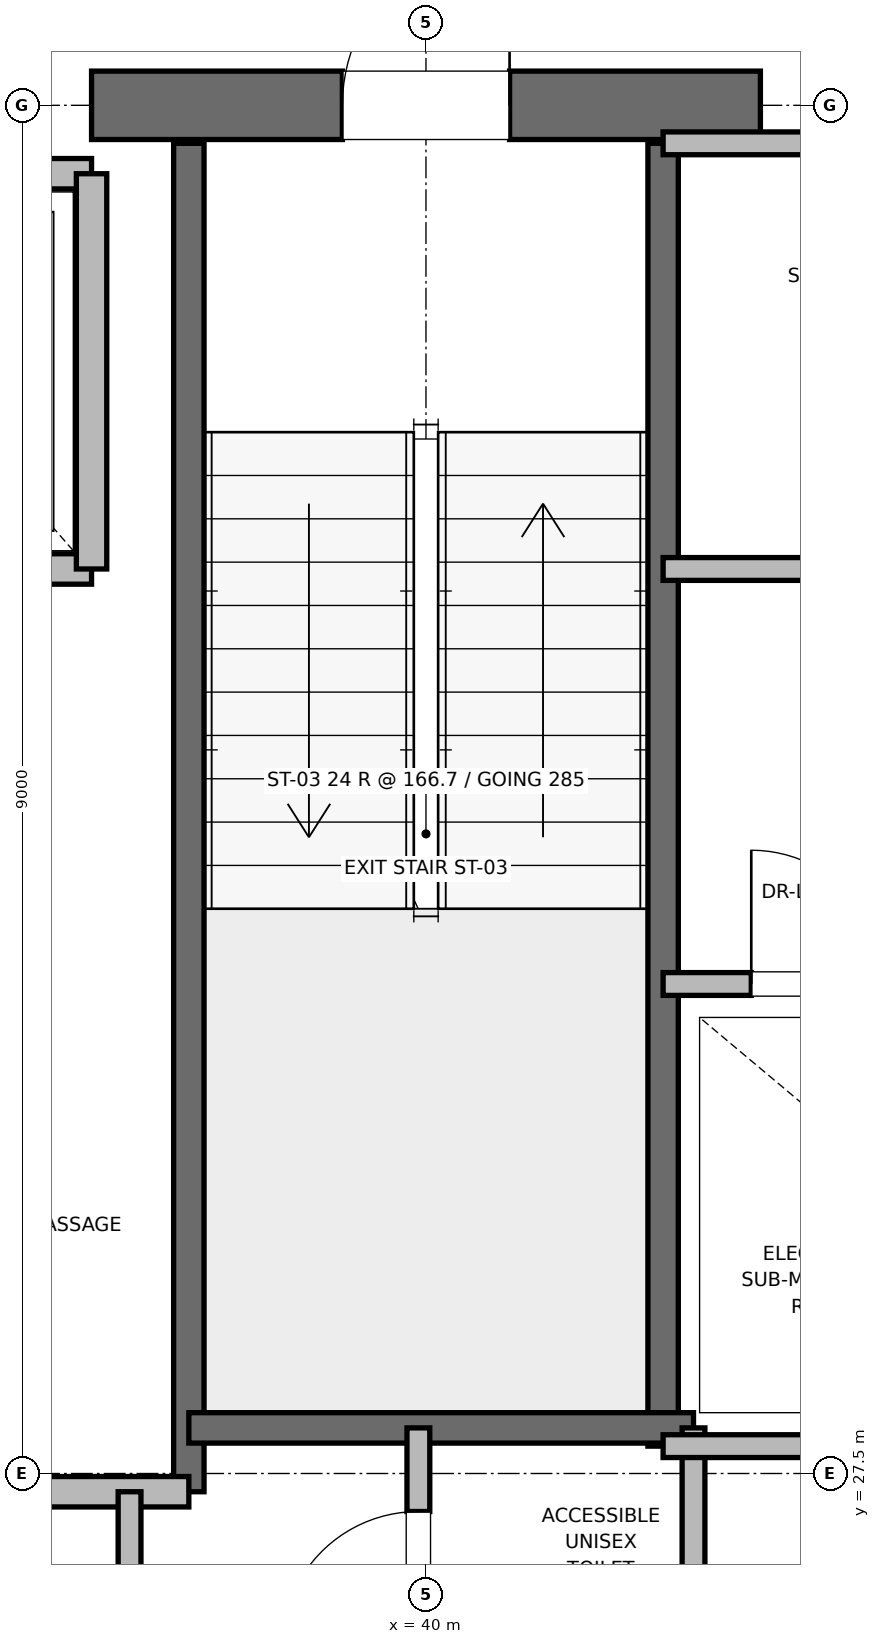
"""IFC4 building model, lengths in metres.
Left out: names, types, materials, properties, quantities, classifications, styles, units other than length and angle.
Written with IfcOpenShell. Run it as: python <this file> out.ifc"""

import sys

from ifc_helpers import new_model, si_unit, direction, frame, frame_2d, origin, place, context, subcontext, project, spatial, rectangle, extrude, element, fill, save


model = new_model("IFC4")
c1 = context("Model", 3, precision=1e-05, world=origin(), true_north=direction((0.0, 1.0)))
c2 = subcontext(c1, "Body", "Model", "MODEL_VIEW")
j1 = project(units=[si_unit("LENGTHUNIT", "METRE"), si_unit("PLANEANGLEUNIT", "RADIAN")], contexts=[c1])
p1 = place(None, origin())
s1 = spatial("IfcSite", under=j1, at=p1, CompositionType="ELEMENT")
p2 = place(p1, origin())
s2 = spatial("IfcBuilding", under=s1, at=p2, CompositionType="ELEMENT")
p3 = place(p2, frame((0.0, 0.0, 283.2)))
s3 = spatial("IfcBuildingStorey", under=s2, at=p3, CompositionType="ELEMENT", Elevation=283.2)
p4 = place(p3, frame((37.8, 36.5, 0.0), z_axis=(0.0, 0.0, 1.0), x_axis=(1.0, 0.0, 0.0)))
e1 = element("IfcWall", 1, at=p4, inside=s3, PredefinedType="SHEAR", context=c2, shape_type="SweptSolid", body=[
    extrude(rectangle(XDim=4.4, YDim=0.45, at=frame_2d((2.2, 0.0))), origin(), (0.0, 0.0, 1.0), 3.785),
])
p5 = place(p4, frame((1.65, 0.0, 0.0)))
e2 = element("IfcOpeningElement", 2, at=p5, cuts=e1, PredefinedType="OPENING", context=c2, shape_type="SweptSolid", body=[
    extrude(rectangle(XDim=1.1, YDim=2.15, at=frame_2d((0.55, 1.075))), frame((0.0, 0.225, 0.0), z_axis=(0.0, -1.0, 0.0), x_axis=(1.0, 0.0, 0.0)), (0.0, 0.0, 1.0), 0.45),
])
p6 = place(p3, frame((38.44, 27.38, 0.0), z_axis=(0.0, 0.0, 1.0), x_axis=(0.0, 1.0, 0.0)))
e3 = element("IfcWall", 3, at=p6, inside=s3, PredefinedType="SOLIDWALL", context=c2, shape_type="SweptSolid", body=[
    extrude(rectangle(XDim=8.87, YDim=0.2, at=frame_2d((4.435, 0.0))), origin(), (0.0, 0.0, 1.0), 3.785),
])
p7 = place(p3, frame((41.56, 27.68, 0.0), z_axis=(0.0, 0.0, 1.0), x_axis=(0.0, 1.0, 0.0)))
e4 = element("IfcWall", 4, at=p7, inside=s3, PredefinedType="SOLIDWALL", context=c2, shape_type="SweptSolid", body=[
    extrude(rectangle(XDim=8.57, YDim=0.2, at=frame_2d((4.285, 0.0))), origin(), (0.0, 0.0, 1.0), 3.785),
])
p8 = place(p3, frame((38.44, 27.8, 0.0), z_axis=(0.0, 0.0, 1.0), x_axis=(1.0, 0.0, 0.0)))
e5 = element("IfcWall", 5, at=p8, inside=s3, PredefinedType="SOLIDWALL", context=c2, shape_type="SweptSolid", body=[
    extrude(rectangle(XDim=3.32, YDim=0.2, at=frame_2d((1.66, 0.0))), origin(), (0.0, 0.0, 1.0), 3.785),
])
p9 = place(p3, frame((32.82, 27.38, 0.0), z_axis=(0.0, 0.0, 1.0), x_axis=(1.0, 0.0, 0.0)))
e6 = element("IfcWall", 6, at=p9, inside=s3, PredefinedType="PARTITIONING", context=c2, shape_type="SweptSolid", body=[
    extrude(rectangle(XDim=5.62, YDim=0.2, at=frame_2d((2.81, 0.0))), origin(), (0.0, 0.0, 1.0), 3.785),
])
p10 = place(p3, frame((35.5, 33.45, 0.0), z_axis=(0.0, 0.0, 1.0), x_axis=(1.0, 0.0, 0.0)))
e7 = element("IfcWall", 7, at=p10, inside=s3, PredefinedType="SOLIDWALL", context=c2, shape_type="SweptSolid", body=[
    extrude(rectangle(XDim=2.3, YDim=0.2, at=frame_2d((1.15, 0.0))), origin(), (0.0, 0.0, 1.0), 3.785),
])
p11 = place(p10, frame((0.6, 0.0, 0.0)))
e8 = element("IfcOpeningElement", 8, at=p11, cuts=e7, PredefinedType="OPENING", context=c2, shape_type="SweptSolid", body=[
    extrude(rectangle(XDim=1.1, YDim=2.2, at=frame_2d((0.55, 1.1))), frame((0.0, 0.1, 0.0), z_axis=(0.0, -1.0, 0.0), x_axis=(1.0, 0.0, 0.0)), (0.0, 0.0, 1.0), 0.2),
])
p12 = place(p3, frame((37.8, 36.05, 0.0), z_axis=(0.0, 0.0, 1.0), x_axis=(-1.0, 0.0, 0.0)))
e9 = element("IfcWall", 9, at=p12, inside=s3, PredefinedType="SOLIDWALL", context=c2, shape_type="SweptSolid", body=[
    extrude(rectangle(XDim=2.3, YDim=0.2, at=frame_2d((1.15, 0.0))), origin(), (0.0, 0.0, 1.0), 2.865),
])
p13 = place(p3, frame((37.8, 33.45, 0.0), z_axis=(0.0, 0.0, 1.0), x_axis=(0.0, 1.0, 0.0)))
e10 = element("IfcWall", 10, at=p13, inside=s3, PredefinedType="SOLIDWALL", context=c2, shape_type="SweptSolid", body=[
    extrude(rectangle(XDim=2.6, YDim=0.2, at=frame_2d((1.3, 0.0))), origin(), (0.0, 0.0, 1.0), 2.865),
])
p14 = place(p3, frame((41.76, 23.8, 0.0), z_axis=(0.0, 0.0, 1.0), x_axis=(0.0, 1.0, 0.0)))
e11 = element("IfcWall", 11, at=p14, inside=s3, PredefinedType="PARTITIONING", context=c2, shape_type="SweptSolid", body=[
    extrude(rectangle(XDim=4.0, YDim=0.15, at=frame_2d((2.0, 0.0))), origin(), (0.0, 0.0, 1.0), 2.85),
])
p15 = place(p3, frame((39.95, 25.8, 0.0), z_axis=(0.0, 0.0, 1.0), x_axis=(0.0, 1.0, 0.0)))
e12 = element("IfcWall", 12, at=p15, inside=s3, PredefinedType="PARTITIONING", context=c2, shape_type="SweptSolid", body=[
    extrude(rectangle(XDim=2.0, YDim=0.15, at=frame_2d((1.0, 0.0))), origin(), (0.0, 0.0, 1.0), 2.85),
])
p16 = place(p15, frame((0.55, 0.0, 0.0)))
e13 = element("IfcOpeningElement", 13, at=p16, cuts=e12, PredefinedType="OPENING", context=c2, shape_type="SweptSolid", body=[
    extrude(rectangle(XDim=0.9, YDim=2.1, at=frame_2d((0.45, 1.05))), frame((0.0, 0.075, 0.0), z_axis=(0.0, -1.0, 0.0), x_axis=(1.0, 0.0, 0.0)), (0.0, 0.0, 1.0), 0.15),
])
p17 = place(p3, frame((38.05, 24.5, 0.0), z_axis=(0.0, 0.0, 1.0), x_axis=(0.0, 1.0, 0.0)))
e14 = element("IfcWall", 14, at=p17, inside=s3, PredefinedType="PARTITIONING", context=c2, shape_type="SweptSolid", body=[
    extrude(rectangle(XDim=2.88, YDim=0.15, at=frame_2d((1.44, 0.0))), origin(), (0.0, 0.0, 1.0), 2.85),
])
p18 = place(p17, frame((0.94, 0.0, 0.0)))
e15 = element("IfcOpeningElement", 15, at=p18, cuts=e14, PredefinedType="OPENING", context=c2, shape_type="SweptSolid", body=[
    extrude(rectangle(XDim=1.0, YDim=2.15, at=frame_2d((0.5, 1.075))), frame((0.0, 0.075, 0.0), z_axis=(0.0, -1.0, 0.0), x_axis=(1.0, 0.0, 0.0)), (0.0, 0.0, 1.0), 0.15),
])
p19 = place(p3, frame((41.56, 27.68, 0.0), z_axis=(0.0, 0.0, 1.0), x_axis=(1.0, 0.0, 0.0)))
e16 = element("IfcWall", 16, at=p19, inside=s3, PredefinedType="PARTITIONING", context=c2, shape_type="SweptSolid", body=[
    extrude(rectangle(XDim=3.59, YDim=0.15, at=frame_2d((1.795, 0.0))), origin(), (0.0, 0.0, 1.0), 2.85),
])
p20 = place(p3, frame((41.56, 30.72, 0.0), z_axis=(0.0, 0.0, 1.0), x_axis=(1.0, 0.0, 0.0)))
e17 = element("IfcWall", 17, at=p20, inside=s3, PredefinedType="PARTITIONING", context=c2, shape_type="SweptSolid", body=[
    extrude(rectangle(XDim=2.04, YDim=0.15, at=frame_2d((1.02, 0.0))), origin(), (0.0, 0.0, 1.0), 2.85),
])
p21 = place(p20, frame((0.58, 0.0, 0.0)))
e18 = element("IfcOpeningElement", 18, at=p21, cuts=e17, PredefinedType="OPENING", context=c2, shape_type="SweptSolid", body=[
    extrude(rectangle(XDim=0.88, YDim=2.1, at=frame_2d((0.44, 1.05))), frame((0.0, 0.075, 0.0), z_axis=(0.0, -1.0, 0.0), x_axis=(1.0, 0.0, 0.0)), (0.0, 0.0, 1.0), 0.15),
])
p22 = place(p3, frame((41.56, 36.25, 0.0), z_axis=(0.0, 0.0, 1.0), x_axis=(1.0, 0.0, 0.0)))
e19 = element("IfcWall", 19, at=p22, inside=s3, PredefinedType="PARTITIONING", context=c2, shape_type="SweptSolid", body=[
    extrude(rectangle(XDim=2.94, YDim=0.15, at=frame_2d((1.47, 0.0))), origin(), (0.0, 0.0, 1.0), 2.85),
])
p23 = place(p3, frame((41.56, 33.45, 0.0), z_axis=(0.0, 0.0, 1.0), x_axis=(1.0, 0.0, 0.0)))
e20 = element("IfcWall", 20, at=p23, inside=s3, PredefinedType="PARTITIONING", context=c2, shape_type="SweptSolid", body=[
    extrude(rectangle(XDim=2.94, YDim=0.15, at=frame_2d((1.47, 0.0))), origin(), (0.0, 0.0, 1.0), 2.85),
])
p24 = place(p23, frame((1.03, 0.0, 0.0)))
e21 = element("IfcOpeningElement", 21, at=p24, cuts=e20, PredefinedType="OPENING", context=c2, shape_type="SweptSolid", body=[
    extrude(rectangle(XDim=0.88, YDim=2.1, at=frame_2d((0.44, 1.05))), frame((0.0, 0.075, 0.0), z_axis=(0.0, -1.0, 0.0), x_axis=(1.0, 0.0, 0.0)), (0.0, 0.0, 1.0), 0.15),
])
p25 = place(p5, origin())
e22 = element("IfcDoor", 22, at=p25, inside=s3, OperationType="SINGLE_SWING_RIGHT", PredefinedType="DOOR", context=c2, shape_type="SweptSolid", body=[
    extrude(rectangle(XDim=1.1, YDim=2.15, at=frame_2d((0.55, 1.075))), frame((0.0, 0.025, 0.0), z_axis=(0.0, -1.0, 0.0), x_axis=(1.0, 0.0, 0.0)), (0.0, 0.0, 1.0), 0.05),
])
fill(e2, e22)
p26 = place(p16, origin())
e23 = element("IfcDoor", 23, at=p26, inside=s3, OperationType="SINGLE_SWING_LEFT", PredefinedType="DOOR", context=c2, shape_type="SweptSolid", body=[
    extrude(rectangle(XDim=0.9, YDim=2.1, at=frame_2d((0.45, 1.05))), frame((0.0, 0.025, 0.0), z_axis=(0.0, -1.0, 0.0), x_axis=(1.0, 0.0, 0.0)), (0.0, 0.0, 1.0), 0.05),
])
fill(e13, e23)
p27 = place(p21, origin())
e24 = element("IfcDoor", 24, at=p27, inside=s3, OperationType="SINGLE_SWING_LEFT", PredefinedType="DOOR", context=c2, shape_type="SweptSolid", body=[
    extrude(rectangle(XDim=0.88, YDim=2.1, at=frame_2d((0.44, 1.05))), frame((0.0, 0.025, 0.0), z_axis=(0.0, -1.0, 0.0), x_axis=(1.0, 0.0, 0.0)), (0.0, 0.0, 1.0), 0.05),
])
fill(e18, e24)
save(model, sys.argv[1])
